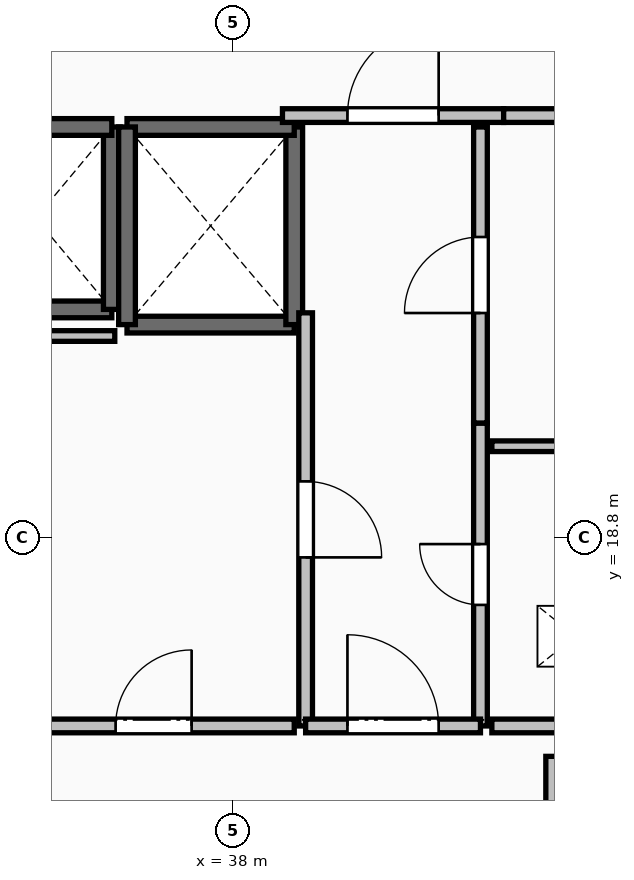
"""IFC4 building model, lengths in metres.
Left out: names, types, materials, properties, quantities, classifications, styles, units other than length and angle.
Written with IfcOpenShell. Run it as: python <this file> out.ifc"""

import sys

from ifc_helpers import new_model, si_unit, direction, frame, frame_2d, origin, place, context, subcontext, project, spatial, rectangle, extrude, element, fill, save


model = new_model("IFC4")
c1 = context("Model", 3, precision=1e-05, world=origin(), true_north=direction((0.0, 1.0)))
c2 = subcontext(c1, "Body", "Model", "MODEL_VIEW")
j1 = project(units=[si_unit("LENGTHUNIT", "METRE"), si_unit("PLANEANGLEUNIT", "RADIAN")], contexts=[c1])
p1 = place(None, origin())
s1 = spatial("IfcSite", under=j1, at=p1, CompositionType="ELEMENT")
p2 = place(p1, origin())
s2 = spatial("IfcBuilding", under=s1, at=p2, CompositionType="ELEMENT")
p3 = place(p2, frame((0.0, 0.0, 9.6)))
s3 = spatial("IfcBuildingStorey", under=s2, at=p3, CompositionType="ELEMENT", Elevation=9.6)
p4 = place(p3, frame((34.4, 21.8, 0.0), z_axis=(0.0, 0.0, 1.0), x_axis=(1.0, 0.0, 0.0)))
e1 = element("IfcWall", 1, at=p4, inside=s3, PredefinedType="SOLIDWALL", context=c2, shape_type="SweptSolid", body=[
    extrude(rectangle(XDim=2.0, YDim=0.22, at=frame_2d((1.0, 0.0))), origin(), (0.0, 0.0, 1.0), 4.48),
])
p5 = place(p3, frame((36.4, 21.8, 0.0), z_axis=(0.0, 0.0, 1.0), x_axis=(0.0, 1.0, 0.0)))
e2 = element("IfcWall", 2, at=p5, inside=s3, PredefinedType="SOLIDWALL", context=c2, shape_type="SweptSolid", body=[
    extrude(rectangle(XDim=2.4, YDim=0.22, at=frame_2d((1.2, 0.0))), origin(), (0.0, 0.0, 1.0), 4.48),
])
p6 = place(p3, frame((36.4, 24.2, 0.0), z_axis=(0.0, 0.0, 1.0), x_axis=(-1.0, 0.0, 0.0)))
e3 = element("IfcWall", 3, at=p6, inside=s3, PredefinedType="SOLIDWALL", context=c2, shape_type="SweptSolid", body=[
    extrude(rectangle(XDim=2.0, YDim=0.22, at=frame_2d((1.0, 0.0))), origin(), (0.0, 0.0, 1.0), 4.48),
])
p7 = place(p3, frame((36.6, 21.6, 0.0), z_axis=(0.0, 0.0, 1.0), x_axis=(1.0, 0.0, 0.0)))
e4 = element("IfcWall", 4, at=p7, inside=s3, PredefinedType="SOLIDWALL", context=c2, shape_type="SweptSolid", body=[
    extrude(rectangle(XDim=2.2, YDim=0.22, at=frame_2d((1.1, 0.0))), origin(), (0.0, 0.0, 1.0), 4.48),
])
p8 = place(p3, frame((38.8, 21.6, 0.0), z_axis=(0.0, 0.0, 1.0), x_axis=(0.0, 1.0, 0.0)))
e5 = element("IfcWall", 5, at=p8, inside=s3, PredefinedType="SOLIDWALL", context=c2, shape_type="SweptSolid", body=[
    extrude(rectangle(XDim=2.6, YDim=0.22, at=frame_2d((1.3, 0.0))), origin(), (0.0, 0.0, 1.0), 4.48),
])
p9 = place(p3, frame((38.8, 24.2, 0.0), z_axis=(0.0, 0.0, 1.0), x_axis=(-1.0, 0.0, 0.0)))
e6 = element("IfcWall", 6, at=p9, inside=s3, PredefinedType="SOLIDWALL", context=c2, shape_type="SweptSolid", body=[
    extrude(rectangle(XDim=2.2, YDim=0.22, at=frame_2d((1.1, 0.0))), origin(), (0.0, 0.0, 1.0), 4.48),
])
p10 = place(p3, frame((36.6, 24.2, 0.0), z_axis=(0.0, 0.0, 1.0), x_axis=(0.0, -1.0, 0.0)))
e7 = element("IfcWall", 7, at=p10, inside=s3, PredefinedType="SOLIDWALL", context=c2, shape_type="SweptSolid", body=[
    extrude(rectangle(XDim=2.6, YDim=0.22, at=frame_2d((1.3, 0.0))), origin(), (0.0, 0.0, 1.0), 4.48),
])
p11 = place(p3, frame((38.645, 24.35, 0.0), z_axis=(0.0, 0.0, 1.0), x_axis=(1.0, 0.0, 0.0)))
e8 = element("IfcWall", 8, at=p11, inside=s3, PredefinedType="PARTITIONING", context=c2, shape_type="SweptSolid", body=[
    extrude(rectangle(XDim=2.91, YDim=0.18, at=frame_2d((1.455, 0.0))), origin(), (0.0, 0.0, 1.0), 4.48),
])
p12 = place(p11, frame((0.855, 0.0, 0.0)))
e9 = element("IfcOpeningElement", 9, at=p12, cuts=e8, PredefinedType="OPENING", context=c2, shape_type="SweptSolid", body=[
    extrude(rectangle(XDim=1.2, YDim=2.15, at=frame_2d((0.6, 1.075))), frame((0.0, 0.105, 0.0), z_axis=(0.0, -1.0, 0.0), x_axis=(1.0, 0.0, 0.0)), (0.0, 0.0, 1.0), 0.21),
])
p13 = place(p3, frame((41.555, 24.35, 0.0), z_axis=(0.0, 0.0, 1.0), x_axis=(1.0, 0.0, 0.0)))
e10 = element("IfcWall", 10, at=p13, inside=s3, PredefinedType="PARTITIONING", context=c2, shape_type="SweptSolid", body=[
    extrude(rectangle(XDim=2.445, YDim=0.18, at=frame_2d((1.223, 0.0))), origin(), (0.0, 0.0, 1.0), 4.48),
])
p14 = place(p13, frame((0.722, 0.0, 0.0)))
e11 = element("IfcOpeningElement", 11, at=p14, cuts=e10, PredefinedType="OPENING", context=c2, shape_type="SweptSolid", body=[
    extrude(rectangle(XDim=1.0, YDim=2.15, at=frame_2d((0.5, 1.075))), frame((0.0, 0.105, 0.0), z_axis=(0.0, -1.0, 0.0), x_axis=(1.0, 0.0, 0.0)), (0.0, 0.0, 1.0), 0.21),
])
p15 = place(p3, frame((41.25, 16.32, 0.0), z_axis=(0.0, 0.0, 1.0), x_axis=(0.0, 1.0, 0.0)))
e12 = element("IfcWall", 12, at=p15, inside=s3, PredefinedType="PARTITIONING", context=c2, shape_type="SweptSolid", body=[
    extrude(rectangle(XDim=3.985, YDim=0.18, at=frame_2d((1.992, 0.0))), origin(), (0.0, 0.0, 1.0), 4.48),
])
p16 = place(p15, frame((1.593, 0.0, 0.0)))
e13 = element("IfcOpeningElement", 13, at=p16, cuts=e12, PredefinedType="OPENING", context=c2, shape_type="SweptSolid", body=[
    extrude(rectangle(XDim=0.8, YDim=2.05, at=frame_2d((0.4, 1.025))), frame((0.0, 0.105, 0.0), z_axis=(0.0, -1.0, 0.0), x_axis=(1.0, 0.0, 0.0)), (0.0, 0.0, 1.0), 0.21),
])
p17 = place(p3, frame((41.25, 20.305, 0.0), z_axis=(0.0, 0.0, 1.0), x_axis=(0.0, 1.0, 0.0)))
e14 = element("IfcWall", 14, at=p17, inside=s3, PredefinedType="PARTITIONING", context=c2, shape_type="SweptSolid", body=[
    extrude(rectangle(XDim=3.895, YDim=0.18, at=frame_2d((1.948, 0.0))), origin(), (0.0, 0.0, 1.0), 4.48),
])
p18 = place(p17, frame((1.448, 0.0, 0.0)))
e15 = element("IfcOpeningElement", 15, at=p18, cuts=e14, PredefinedType="OPENING", context=c2, shape_type="SweptSolid", body=[
    extrude(rectangle(XDim=1.0, YDim=2.15, at=frame_2d((0.5, 1.075))), frame((0.0, 0.105, 0.0), z_axis=(0.0, -1.0, 0.0), x_axis=(1.0, 0.0, 0.0)), (0.0, 0.0, 1.0), 0.21),
])
p19 = place(p3, frame((38.95, 21.755, 0.0), z_axis=(0.0, 0.0, 1.0), x_axis=(0.0, -1.0, 0.0)))
e16 = element("IfcWall", 16, at=p19, inside=s3, PredefinedType="PARTITIONING", context=c2, shape_type="SweptSolid", body=[
    extrude(rectangle(XDim=5.435, YDim=0.18, at=frame_2d((2.717, 0.0))), origin(), (0.0, 0.0, 1.0), 4.48),
])
p20 = place(p19, frame((2.218, 0.0, 0.0)))
e17 = element("IfcOpeningElement", 17, at=p20, cuts=e16, PredefinedType="OPENING", context=c2, shape_type="SweptSolid", body=[
    extrude(rectangle(XDim=1.0, YDim=2.15, at=frame_2d((0.5, 1.075))), frame((0.0, 0.105, 0.0), z_axis=(0.0, -1.0, 0.0), x_axis=(1.0, 0.0, 0.0)), (0.0, 0.0, 1.0), 0.21),
])
p21 = place(p3, frame((38.95, 16.32, 0.0), z_axis=(0.0, 0.0, 1.0), x_axis=(1.0, 0.0, 0.0)))
e18 = element("IfcWall", 18, at=p21, inside=s3, PredefinedType="PARTITIONING", context=c2, shape_type="SweptSolid", body=[
    extrude(rectangle(XDim=2.3, YDim=0.18, at=frame_2d((1.15, 0.0))), origin(), (0.0, 0.0, 1.0), 4.48),
])
p22 = place(p21, frame((0.55, 0.0, 0.0)))
e19 = element("IfcOpeningElement", 19, at=p22, cuts=e18, PredefinedType="OPENING", context=c2, shape_type="SweptSolid", body=[
    extrude(rectangle(XDim=1.2, YDim=2.15, at=frame_2d((0.6, 1.075))), frame((0.0, 0.105, 0.0), z_axis=(0.0, -1.0, 0.0), x_axis=(1.0, 0.0, 0.0)), (0.0, 0.0, 1.0), 0.21),
])
p23 = place(p3, frame((44.6, 20.0, 0.0), z_axis=(0.0, 0.0, 1.0), x_axis=(-1.0, 0.0, 0.0)))
e20 = element("IfcWall", 20, at=p23, inside=s3, PredefinedType="PARTITIONING", context=c2, shape_type="SweptSolid", body=[
    extrude(rectangle(XDim=3.2, YDim=0.14, at=frame_2d((1.6, 0.0))), origin(), (0.0, 0.0, 1.0), 4.48),
])
p24 = place(p3, frame((41.4, 16.32, 0.0), z_axis=(0.0, 0.0, 1.0), x_axis=(1.0, 0.0, 0.0)))
e21 = element("IfcWall", 21, at=p24, inside=s3, PredefinedType="PARTITIONING", context=c2, shape_type="SweptSolid", body=[
    extrude(rectangle(XDim=3.2, YDim=0.18, at=frame_2d((1.6, 0.0))), origin(), (0.0, 0.0, 1.0), 4.48),
])
p25 = place(p24, frame((1.2, 0.0, 0.0)))
e22 = element("IfcOpeningElement", 22, at=p25, cuts=e21, PredefinedType="OPENING", context=c2, shape_type="SweptSolid", body=[
    extrude(rectangle(XDim=0.8, YDim=2.05, at=frame_2d((0.4, 1.025))), frame((0.0, 0.105, 0.0), z_axis=(0.0, -1.0, 0.0), x_axis=(1.0, 0.0, 0.0)), (0.0, 0.0, 1.0), 0.21),
])
p26 = place(p3, frame((35.1, 16.32, 0.0), z_axis=(0.0, 0.0, 1.0), x_axis=(1.0, 0.0, 0.0)))
e23 = element("IfcWall", 23, at=p26, inside=s3, PredefinedType="PARTITIONING", context=c2, shape_type="SweptSolid", body=[
    extrude(rectangle(XDim=3.7, YDim=0.18, at=frame_2d((1.85, 0.0))), origin(), (0.0, 0.0, 1.0), 4.48),
])
p27 = place(p26, frame((1.35, 0.0, 0.0)))
e24 = element("IfcOpeningElement", 24, at=p27, cuts=e23, PredefinedType="OPENING", context=c2, shape_type="SweptSolid", body=[
    extrude(rectangle(XDim=1.0, YDim=2.15, at=frame_2d((0.5, 1.075))), frame((0.0, 0.105, 0.0), z_axis=(0.0, -1.0, 0.0), x_axis=(1.0, 0.0, 0.0)), (0.0, 0.0, 1.0), 0.21),
])
p28 = place(p3, frame((42.2, 14.1, 0.0), z_axis=(0.0, 0.0, 1.0), x_axis=(0.0, 1.0, 0.0)))
e25 = element("IfcWall", 25, at=p28, inside=s3, PredefinedType="PARTITIONING", context=c2, shape_type="SweptSolid", body=[
    extrude(rectangle(XDim=1.82, YDim=0.18, at=frame_2d((0.91, 0.0))), origin(), (0.0, 0.0, 1.0), 4.48),
])
p29 = place(p3, frame((36.439, 21.45, 0.0), z_axis=(0.0, 0.0, 1.0), x_axis=(-1.0, 0.0, 0.0)))
e26 = element("IfcWall", 26, at=p29, inside=s3, PredefinedType="PARTITIONING", context=c2, shape_type="SweptSolid", body=[
    extrude(rectangle(XDim=1.259, YDim=0.14, at=frame_2d((0.629, 0.0))), origin(), (0.0, 0.0, 1.0), 4.48),
])
p30 = place(p12, origin())
e27 = element("IfcDoor", 27, at=p30, inside=s3, OperationType="SINGLE_SWING_RIGHT", PredefinedType="DOOR", context=c2, shape_type="SweptSolid", body=[
    extrude(rectangle(XDim=1.2, YDim=2.15, at=frame_2d((0.6, 1.075))), frame((0.0, 0.025, 0.0), z_axis=(0.0, -1.0, 0.0), x_axis=(1.0, 0.0, 0.0)), (0.0, 0.0, 1.0), 0.05),
])
fill(e9, e27)
p31 = place(p16, origin())
e28 = element("IfcDoor", 28, at=p31, inside=s3, OperationType="SINGLE_SWING_RIGHT", PredefinedType="DOOR", context=c2, shape_type="SweptSolid", body=[
    extrude(rectangle(XDim=0.8, YDim=2.05, at=frame_2d((0.4, 1.025))), frame((0.0, 0.025, 0.0), z_axis=(0.0, -1.0, 0.0), x_axis=(1.0, 0.0, 0.0)), (0.0, 0.0, 1.0), 0.05),
])
fill(e13, e28)
p32 = place(p18, origin())
e29 = element("IfcDoor", 29, at=p32, inside=s3, OperationType="SINGLE_SWING_LEFT", PredefinedType="DOOR", context=c2, shape_type="SweptSolid", body=[
    extrude(rectangle(XDim=1.0, YDim=2.15, at=frame_2d((0.5, 1.075))), frame((0.0, 0.025, 0.0), z_axis=(0.0, -1.0, 0.0), x_axis=(1.0, 0.0, 0.0)), (0.0, 0.0, 1.0), 0.05),
])
fill(e15, e29)
p33 = place(p20, origin())
e30 = element("IfcDoor", 30, at=p33, inside=s3, OperationType="SINGLE_SWING_RIGHT", PredefinedType="DOOR", context=c2, shape_type="SweptSolid", body=[
    extrude(rectangle(XDim=1.0, YDim=2.15, at=frame_2d((0.5, 1.075))), frame((0.0, 0.025, 0.0), z_axis=(0.0, -1.0, 0.0), x_axis=(1.0, 0.0, 0.0)), (0.0, 0.0, 1.0), 0.05),
])
fill(e17, e30)
p34 = place(p22, origin())
e31 = element("IfcDoor", 31, at=p34, inside=s3, OperationType="SINGLE_SWING_LEFT", PredefinedType="DOOR", context=c2, shape_type="SweptSolid", body=[
    extrude(rectangle(XDim=1.2, YDim=2.15, at=frame_2d((0.6, 1.075))), frame((0.0, 0.025, 0.0), z_axis=(0.0, -1.0, 0.0), x_axis=(1.0, 0.0, 0.0)), (0.0, 0.0, 1.0), 0.05),
])
fill(e19, e31)
p35 = place(p27, origin())
e32 = element("IfcDoor", 32, at=p35, inside=s3, OperationType="SINGLE_SWING_RIGHT", PredefinedType="DOOR", context=c2, shape_type="SweptSolid", body=[
    extrude(rectangle(XDim=1.0, YDim=2.15, at=frame_2d((0.5, 1.075))), frame((0.0, 0.025, 0.0), z_axis=(0.0, -1.0, 0.0), x_axis=(1.0, 0.0, 0.0)), (0.0, 0.0, 1.0), 0.05),
])
fill(e24, e32)
save(model, sys.argv[1])
